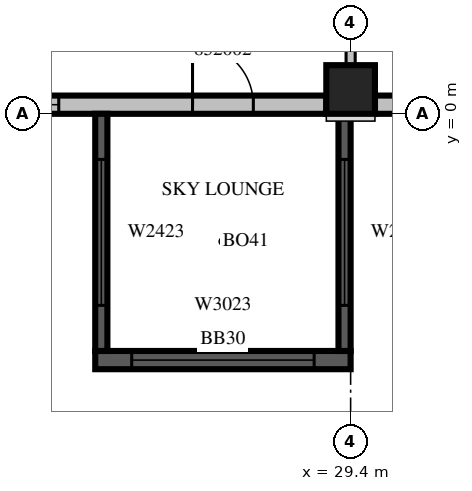
"""IFC4 building model, lengths in metres.
Left out: names, types, materials, properties, quantities, classifications, styles, units other than length and angle.
Written with IfcOpenShell. Run it as: python <this file> out.ifc"""

import sys

from ifc_helpers import new_model, si_unit, direction, frame, frame_2d, origin, origin_2d, place, context, subcontext, project, spatial, rectangle, extrude, source, transform, mapped, element, fill, save


model = new_model("IFC4")
c1 = context("Model", 3, precision=1e-05, world=origin(), true_north=direction((0.0, 1.0)))
c2 = subcontext(c1, "Body", "Model", "MODEL_VIEW")
j1 = project(units=[si_unit("LENGTHUNIT", "METRE"), si_unit("PLANEANGLEUNIT", "RADIAN")], contexts=[c1])
p1 = place(None, origin())
s1 = spatial("IfcSite", under=j1, at=p1, CompositionType="ELEMENT")
p2 = place(p1, origin())
s2 = spatial("IfcBuilding", under=s1, at=p2, CompositionType="ELEMENT")
p3 = place(p2, frame((0.0, 0.0, 231.0)))
s3 = spatial("IfcBuildingStorey", under=s2, at=p3, CompositionType="ELEMENT", Elevation=231.0)
m1 = source(origin(), c2, "Body", "SweptSolid", [
    extrude(rectangle(XDim=0.8, YDim=0.8, at=origin_2d()), origin(), (0.0, 0.0, 1.0), 3.8),
])
p4 = place(p3, frame((29.4, 0.4, 0.0), z_axis=(0.0, 0.0, 1.0), x_axis=(1.0, 0.0, 0.0)))
e1 = element("IfcColumn", 1, at=p4, inside=s3, PredefinedType="COLUMN", context=c2, shape_type="MappedRepresentation", body=[
    mapped(m1, transform((0.0, 0.0, 0.0), scale=1.0)),
])
m2 = source(origin(), c2, "Body", "SweptSolid", [
    extrude(rectangle(XDim=7.6, YDim=0.3, at=frame_2d((3.8, 0.0))), origin(), (0.0, 0.0, 1.0), 3.4),
])
p5 = place(p3, frame((21.4, 0.15, 0.0), z_axis=(0.0, 0.0, 1.0), x_axis=(1.0, 0.0, 0.0)))
e2 = element("IfcWall", 2, at=p5, inside=s3, PredefinedType="STANDARD", context=c2, shape_type="MappedRepresentation", body=[
    mapped(m2, transform((0.0, 0.0, 0.0), scale=1.0)),
])
m3 = source(origin(), c2, "Body", "SweptSolid", [
    extrude(rectangle(XDim=3.0, YDim=2.3, at=frame_2d((1.5, 1.15))), frame((0.0, 0.16, 0.0), z_axis=(0.0, -1.0, 0.0), x_axis=(1.0, 0.0, 0.0)), (0.0, 0.0, 1.0), 0.32),
])
p6 = place(p5, frame((0.2, 0.0, 0.6)))
e3 = element("IfcOpeningElement", 3, at=p6, cuts=e2, PredefinedType="OPENING", context=c2, shape_type="MappedRepresentation", body=[
    mapped(m3, transform((0.0, 0.0, 0.0), scale=1.0)),
])
m4 = source(origin(), c2, "Body", "SweptSolid", [
    extrude(rectangle(XDim=1.0, YDim=2.1, at=frame_2d((0.5, 1.05))), frame((0.0, 0.16, 0.0), z_axis=(0.0, -1.0, 0.0), x_axis=(1.0, 0.0, 0.0)), (0.0, 0.0, 1.0), 0.32),
])
p7 = place(p5, frame((5.4, 0.0, 0.0)))
e4 = element("IfcOpeningElement", 4, at=p7, cuts=e2, PredefinedType="OPENING", context=c2, shape_type="MappedRepresentation", body=[
    mapped(m4, transform((0.0, 0.0, 0.0), scale=1.0)),
])
p8 = place(p3, frame((29.8, 0.15, 0.0), z_axis=(0.0, 0.0, 1.0), x_axis=(1.0, 0.0, 0.0)))
e5 = element("IfcWall", 5, at=p8, inside=s3, PredefinedType="STANDARD", context=c2, shape_type="MappedRepresentation", body=[
    mapped(m2, transform((0.0, 0.0, 0.0), scale=1.0)),
])
m5 = source(origin(), c2, "Body", "SweptSolid", [
    extrude(rectangle(XDim=1.2, YDim=2.3, at=frame_2d((0.6, 1.15))), frame((0.0, 0.16, 0.0), z_axis=(0.0, -1.0, 0.0), x_axis=(1.0, 0.0, 0.0)), (0.0, 0.0, 1.0), 0.32),
])
p9 = place(p8, frame((0.487, 0.0, 0.6)))
e6 = element("IfcOpeningElement", 6, at=p9, cuts=e5, PredefinedType="OPENING", context=c2, shape_type="MappedRepresentation", body=[
    mapped(m5, transform((0.0, 0.0, 0.0), scale=1.0)),
])
p10 = place(p8, frame((6.013, 0.0, 0.6)))
e7 = element("IfcOpeningElement", 7, at=p10, cuts=e5, PredefinedType="OPENING", context=c2, shape_type="MappedRepresentation", body=[
    mapped(m5, transform((0.0, 0.0, 0.0), scale=1.0)),
])
m6 = source(origin(), c2, "Body", "SweptSolid", [
    extrude(rectangle(XDim=2.4, YDim=2.3, at=frame_2d((1.2, 1.15))), frame((0.0, 0.16, 0.0), z_axis=(0.0, -1.0, 0.0), x_axis=(1.0, 0.0, 0.0)), (0.0, 0.0, 1.0), 0.32),
])
p11 = place(p8, frame((2.65, 0.0, 0.6)))
e8 = element("IfcOpeningElement", 8, at=p11, cuts=e5, PredefinedType="OPENING", context=c2, shape_type="MappedRepresentation", body=[
    mapped(m6, transform((0.0, 0.0, 0.0), scale=1.0)),
])
m7 = source(origin(), c2, "Body", "SweptSolid", [
    extrude(rectangle(XDim=4.2, YDim=0.3, at=frame_2d((2.1, 0.0))), origin(), (0.0, 0.0, 1.0), 3.39),
])
p12 = place(p3, frame((25.2, -4.05, 0.0), z_axis=(0.0, 0.0, 1.0), x_axis=(1.0, 0.0, 0.0)))
e9 = element("IfcWall", 9, at=p12, inside=s3, PredefinedType="SOLIDWALL", context=c2, shape_type="MappedRepresentation", body=[
    mapped(m7, transform((0.0, 0.0, 0.0), scale=1.0)),
])
p13 = place(p12, frame((0.6, 0.0, 0.6)))
e10 = element("IfcOpeningElement", 10, at=p13, cuts=e9, PredefinedType="OPENING", context=c2, shape_type="MappedRepresentation", body=[
    mapped(m3, transform((0.0, 0.0, 0.0), scale=1.0)),
])
m8 = source(origin(), c2, "Body", "SweptSolid", [
    extrude(rectangle(XDim=3.9, YDim=0.2, at=frame_2d((1.95, 0.0))), origin(), (0.0, 0.0, 1.0), 3.39),
])
p14 = place(p3, frame((25.3, 0.0, 0.0), z_axis=(0.0, 0.0, 1.0), x_axis=(0.0, -1.0, 0.0)))
e11 = element("IfcWall", 11, at=p14, inside=s3, PredefinedType="SOLIDWALL", context=c2, shape_type="MappedRepresentation", body=[
    mapped(m8, transform((0.0, 0.0, 0.0), scale=1.0)),
])
m9 = source(origin(), c2, "Body", "SweptSolid", [
    extrude(rectangle(XDim=2.4, YDim=2.3, at=frame_2d((1.2, 1.15))), frame((0.0, 0.11, 0.0), z_axis=(0.0, -1.0, 0.0), x_axis=(1.0, 0.0, 0.0)), (0.0, 0.0, 1.0), 0.22),
])
p15 = place(p14, frame((0.75, 0.0, 0.6)))
e12 = element("IfcOpeningElement", 12, at=p15, cuts=e11, PredefinedType="OPENING", context=c2, shape_type="MappedRepresentation", body=[
    mapped(m9, transform((0.0, 0.0, 0.0), scale=1.0)),
])
p16 = place(p3, frame((29.3, 0.0, 0.0), z_axis=(0.0, 0.0, 1.0), x_axis=(0.0, -1.0, 0.0)))
e13 = element("IfcWall", 13, at=p16, inside=s3, PredefinedType="SOLIDWALL", context=c2, shape_type="MappedRepresentation", body=[
    mapped(m8, transform((0.0, 0.0, 0.0), scale=1.0)),
])
p17 = place(p16, frame((0.75, 0.0, 0.6)))
e14 = element("IfcOpeningElement", 14, at=p17, cuts=e13, PredefinedType="OPENING", context=c2, shape_type="MappedRepresentation", body=[
    mapped(m9, transform((0.0, 0.0, 0.0), scale=1.0)),
])
m10 = source(origin(), c2, "Body", "SweptSolid", [
    extrude(rectangle(XDim=2.656, YDim=0.15, at=frame_2d((1.328, 0.0))), origin(), (0.0, 0.0, 1.0), 3.4),
])
p18 = place(p3, frame((29.4, 0.799, 0.0), z_axis=(0.0, 0.0, 1.0), x_axis=(0.0, 1.0, 0.0)))
e15 = element("IfcWall", 15, at=p18, inside=s3, PredefinedType="PARTITIONING", context=c2, shape_type="MappedRepresentation", body=[
    mapped(m10, transform((0.0, 0.0, 0.0), scale=1.0)),
])
m11 = source(origin(), c2, "Body", "SweptSolid", [
    extrude(rectangle(XDim=3.0, YDim=2.3, at=frame_2d((1.5, 1.15))), frame((0.0, 0.03, 0.0), z_axis=(0.0, -1.0, 0.0), x_axis=(1.0, 0.0, 0.0)), (0.0, 0.0, 1.0), 0.06),
])
p19 = place(p6, origin())
e16 = element("IfcWindow", 16, at=p19, inside=s3, PartitioningType="SINGLE_PANEL", PredefinedType="WINDOW", context=c2, shape_type="MappedRepresentation", body=[
    mapped(m11, transform((0.0, 0.0, 0.0), scale=1.0)),
])
fill(e3, e16)
p20 = place(p13, origin())
e17 = element("IfcWindow", 17, at=p20, inside=s3, PartitioningType="SINGLE_PANEL", PredefinedType="WINDOW", context=c2, shape_type="MappedRepresentation", body=[
    mapped(m11, transform((0.0, 0.0, 0.0), scale=1.0)),
])
fill(e10, e17)
m12 = source(origin(), c2, "Body", "SweptSolid", [
    extrude(rectangle(XDim=2.4, YDim=2.3, at=frame_2d((1.2, 1.15))), frame((0.0, 0.03, 0.0), z_axis=(0.0, -1.0, 0.0), x_axis=(1.0, 0.0, 0.0)), (0.0, 0.0, 1.0), 0.06),
])
p21 = place(p15, origin())
e18 = element("IfcWindow", 18, at=p21, inside=s3, PartitioningType="SINGLE_PANEL", PredefinedType="WINDOW", context=c2, shape_type="MappedRepresentation", body=[
    mapped(m12, transform((0.0, 0.0, 0.0), scale=1.0)),
])
fill(e12, e18)
p22 = place(p17, origin())
e19 = element("IfcWindow", 19, at=p22, inside=s3, PartitioningType="SINGLE_PANEL", PredefinedType="WINDOW", context=c2, shape_type="MappedRepresentation", body=[
    mapped(m12, transform((0.0, 0.0, 0.0), scale=1.0)),
])
fill(e14, e19)
m13 = source(origin(), c2, "Body", "SweptSolid", [
    extrude(rectangle(XDim=1.0, YDim=2.1, at=frame_2d((0.5, 1.05))), frame((0.0, 0.025, 0.0), z_axis=(0.0, -1.0, 0.0), x_axis=(1.0, 0.0, 0.0)), (0.0, 0.0, 1.0), 0.05),
])
p23 = place(p7, origin())
e20 = element("IfcDoor", 20, at=p23, inside=s3, OperationType="SINGLE_SWING_LEFT", PredefinedType="DOOR", context=c2, shape_type="MappedRepresentation", body=[
    mapped(m13, transform((0.0, 0.0, 0.0), scale=1.0)),
])
fill(e4, e20)
save(model, sys.argv[1])
